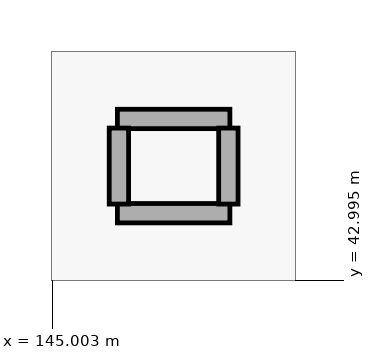
"""IFC4 building model, lengths in metres.
Left out: names, types, materials, properties, quantities, classifications, styles, units other than length and angle.
Written with IfcOpenShell. Run it as: python <this file> out.ifc"""

import sys

from ifc_helpers import new_model, si_unit, direction, frame, frame_2d, origin, place, context, subcontext, project, spatial, rectangle, extrude, element, save


model = new_model("IFC4")
c1 = context("Model", 3, precision=1e-05, world=origin(), true_north=direction((0.0, 1.0)))
c2 = subcontext(c1, "Body", "Model", "MODEL_VIEW")
j1 = project(units=[si_unit("LENGTHUNIT", "METRE"), si_unit("PLANEANGLEUNIT", "RADIAN")], contexts=[c1])
p1 = place(None, origin())
s1 = spatial("IfcSite", under=j1, at=p1, CompositionType="ELEMENT")
p2 = place(p1, origin())
s2 = spatial("IfcBuilding", under=s1, at=p2, CompositionType="ELEMENT")
p3 = place(p2, frame((0.0, 0.0, 20.7)))
s3 = spatial("IfcBuildingStorey", under=s2, at=p3, CompositionType="ELEMENT", Elevation=20.7)
for number, where, z_axis, x_axis in (
    (1, (145.86, 45.12, 0.0), (0.0, 0.0, 1.0), (1.0, 0.0, 0.0)),
    (2, (145.86, 43.88, 0.0), (0.0, 0.0, 1.0), (1.0, 0.0, 0.0)),
):
    element("IfcWall", number, at=place(p3, frame(where, z_axis=z_axis, x_axis=x_axis)), inside=s3, PredefinedType="PARTITIONING", context=c2, shape_type="SweptSolid", body=[
        extrude(rectangle(XDim=1.48, YDim=0.255, at=frame_2d((0.74, 0.0))), origin(), (0.0, 0.0, 1.0), 4.98),
    ])
for number, where, z_axis, x_axis in (
    (3, (145.88, 44.0, 0.0), (0.0, 0.0, 1.0), (0.0, 1.0, 0.0)),
    (4, (147.32, 44.0, 0.0), (0.0, 0.0, 1.0), (0.0, 1.0, 0.0)),
):
    element("IfcWall", number, at=place(p3, frame(where, z_axis=z_axis, x_axis=x_axis)), inside=s3, PredefinedType="PARTITIONING", context=c2, shape_type="SweptSolid", body=[
        extrude(rectangle(XDim=1.0, YDim=0.255, at=frame_2d((0.5, 0.0))), origin(), (0.0, 0.0, 1.0), 4.98),
    ])
save(model, sys.argv[1])
